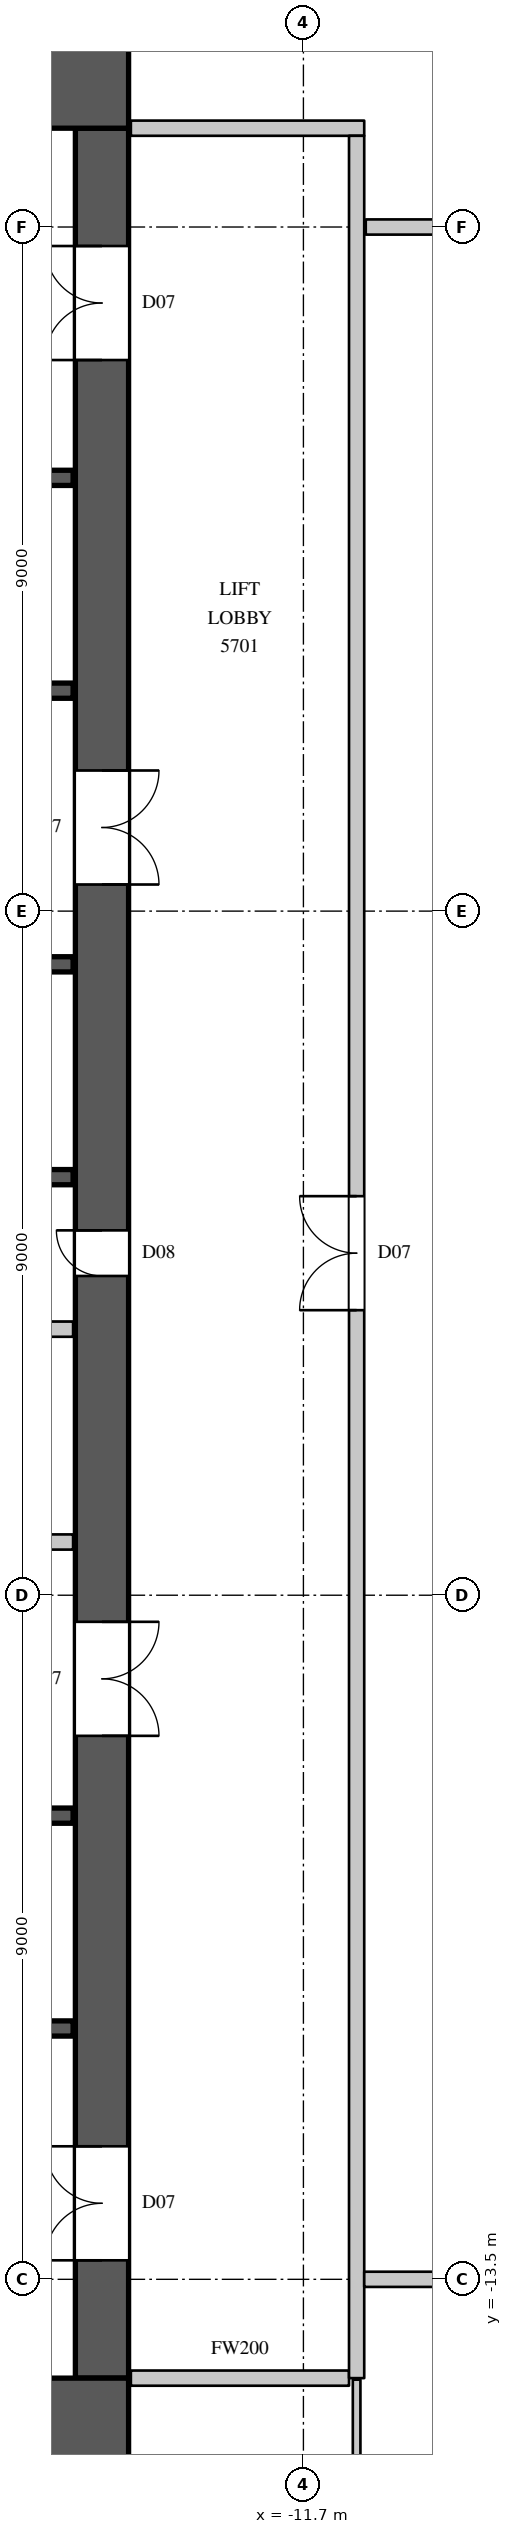
"""IFC4 building model, lengths in metres.
Left out: names, types, materials, properties, quantities, classifications, styles, units other than length and angle.
Written with IfcOpenShell. Run it as: python <this file> out.ifc"""

import sys

from ifc_helpers import new_model, si_unit, direction, frame, frame_2d, origin, place, context, subcontext, project, spatial, rectangle, extrude, element, fill, save


model = new_model("IFC4")
c1 = context("Model", 3, precision=1e-05, world=origin(), true_north=direction((0.0, 1.0)))
c2 = subcontext(c1, "Body", "Model", "MODEL_VIEW")
j1 = project(units=[si_unit("LENGTHUNIT", "METRE"), si_unit("PLANEANGLEUNIT", "RADIAN")], contexts=[c1])
p1 = place(None, origin())
s1 = spatial("IfcSite", under=j1, at=p1, CompositionType="ELEMENT")
p2 = place(p1, origin())
s2 = spatial("IfcBuilding", under=s1, at=p2, CompositionType="ELEMENT")
p3 = place(p2, frame((0.0, 0.0, 255.7)))
s3 = spatial("IfcBuildingStorey", under=s2, at=p3, CompositionType="ELEMENT", Elevation=255.7)
for number, where, z_axis, x_axis in (
    (1, (-30.0, 15.4, 0.0), (0.0, 0.0, 1.0), (1.0, 0.0, 0.0)),
    (2, (-30.0, -15.4, 0.0), (0.0, 0.0, 1.0), (1.0, 0.0, 0.0)),
):
    element("IfcWall", number, at=place(p3, frame(where, z_axis=z_axis, x_axis=x_axis)), inside=s3, PredefinedType="SHEAR", context=c2, shape_type="SweptSolid", body=[
        extrude(rectangle(XDim=16.0, YDim=1.2, at=frame_2d((8.0, 0.0))), origin(), (0.0, 0.0, 1.0), 4.1),
    ])
p4 = place(p3, frame((-14.35, -14.8, 0.0), z_axis=(0.0, 0.0, 1.0), x_axis=(0.0, 1.0, 0.0)))
e3 = element("IfcWall", 3, at=p4, inside=s3, PredefinedType="SHEAR", context=c2, shape_type="SweptSolid", body=[
    extrude(rectangle(XDim=29.6, YDim=0.7, at=frame_2d((14.8, 0.0))), origin(), (0.0, 0.0, 1.0), 4.1),
])
p5 = place(p4, frame((1.55, 0.0, 0.0)))
e4 = element("IfcOpeningElement", 4, at=p5, cuts=e3, PredefinedType="OPENING", context=c2, shape_type="SweptSolid", body=[
    extrude(rectangle(XDim=1.5, YDim=2.4, at=frame_2d((0.75, 1.2))), frame((0.0, 0.36, 0.0), z_axis=(0.0, -1.0, 0.0), x_axis=(1.0, 0.0, 0.0)), (0.0, 0.0, 1.0), 0.72),
])
p6 = place(p4, frame((26.55, 0.0, 0.0)))
e5 = element("IfcOpeningElement", 5, at=p6, cuts=e3, PredefinedType="OPENING", context=c2, shape_type="SweptSolid", body=[
    extrude(rectangle(XDim=1.5, YDim=2.4, at=frame_2d((0.75, 1.2))), frame((0.0, 0.36, 0.0), z_axis=(0.0, -1.0, 0.0), x_axis=(1.0, 0.0, 0.0)), (0.0, 0.0, 1.0), 0.72),
])
p7 = place(p4, frame((8.45, 0.0, 0.0)))
e6 = element("IfcOpeningElement", 6, at=p7, cuts=e3, PredefinedType="OPENING", context=c2, shape_type="SweptSolid", body=[
    extrude(rectangle(XDim=1.5, YDim=2.4, at=frame_2d((0.75, 1.2))), frame((0.0, 0.36, 0.0), z_axis=(0.0, -1.0, 0.0), x_axis=(1.0, 0.0, 0.0)), (0.0, 0.0, 1.0), 0.72),
])
p8 = place(p4, frame((19.65, 0.0, 0.0)))
e7 = element("IfcOpeningElement", 7, at=p8, cuts=e3, PredefinedType="OPENING", context=c2, shape_type="SweptSolid", body=[
    extrude(rectangle(XDim=1.5, YDim=2.4, at=frame_2d((0.75, 1.2))), frame((0.0, 0.36, 0.0), z_axis=(0.0, -1.0, 0.0), x_axis=(1.0, 0.0, 0.0)), (0.0, 0.0, 1.0), 0.72),
])
p9 = place(p4, frame((14.5, 0.0, 0.0)))
e8 = element("IfcOpeningElement", 8, at=p9, cuts=e3, PredefinedType="OPENING", context=c2, shape_type="SweptSolid", body=[
    extrude(rectangle(XDim=0.6, YDim=2.0, at=frame_2d((0.3, 1.0))), frame((0.0, 0.36, 0.0), z_axis=(0.0, -1.0, 0.0), x_axis=(1.0, 0.0, 0.0)), (0.0, 0.0, 1.0), 0.72),
])
p10 = place(p3, frame((-29.27, -3.8, 0.0), z_axis=(0.0, 0.0, 1.0), x_axis=(1.0, 0.0, 0.0)))
e9 = element("IfcWall", 9, at=p10, inside=s3, PredefinedType="PARTITIONING", context=c2, shape_type="SweptSolid", body=[
    extrude(rectangle(XDim=14.54, YDim=0.2, at=frame_2d((7.27, 0.0))), origin(), (0.0, 0.0, 1.0), 3.8),
])
p11 = place(p10, frame((6.8, 0.0, 0.0)))
e10 = element("IfcOpeningElement", 10, at=p11, cuts=e9, PredefinedType="OPENING", context=c2, shape_type="SweptSolid", body=[
    extrude(rectangle(XDim=0.9, YDim=2.2, at=frame_2d((0.45, 1.1))), frame((0.0, 0.11, 0.0), z_axis=(0.0, -1.0, 0.0), x_axis=(1.0, 0.0, 0.0)), (0.0, 0.0, 1.0), 0.22),
])
p12 = place(p3, frame((-13.97, -14.8, 0.0), z_axis=(0.0, 0.0, 1.0), x_axis=(1.0, 0.0, 0.0)))
e11 = element("IfcWall", 11, at=p12, inside=s3, PredefinedType="PARTITIONING", context=c2, shape_type="SweptSolid", body=[
    extrude(rectangle(XDim=2.87, YDim=0.2, at=frame_2d((1.435, 0.0))), origin(), (0.0, 0.0, 1.0), 3.8),
])
p13 = place(p3, frame((-13.97, 14.8, 0.0), z_axis=(0.0, 0.0, 1.0), x_axis=(1.0, 0.0, 0.0)))
e12 = element("IfcWall", 12, at=p13, inside=s3, PredefinedType="PARTITIONING", context=c2, shape_type="SweptSolid", body=[
    extrude(rectangle(XDim=3.07, YDim=0.2, at=frame_2d((1.535, 0.0))), origin(), (0.0, 0.0, 1.0), 3.8),
])
p14 = place(p3, frame((-11.0, -14.8, 0.0), z_axis=(0.0, 0.0, 1.0), x_axis=(0.0, 1.0, 0.0)))
e13 = element("IfcWall", 13, at=p14, inside=s3, PredefinedType="PARTITIONING", context=c2, shape_type="SweptSolid", body=[
    extrude(rectangle(XDim=29.5, YDim=0.2, at=frame_2d((14.75, 0.0))), origin(), (0.0, 0.0, 1.0), 3.8),
])
p15 = place(p14, frame((14.05, 0.0, 0.0)))
e14 = element("IfcOpeningElement", 14, at=p15, cuts=e13, PredefinedType="OPENING", context=c2, shape_type="SweptSolid", body=[
    extrude(rectangle(XDim=1.5, YDim=2.4, at=frame_2d((0.75, 1.2))), frame((0.0, 0.11, 0.0), z_axis=(0.0, -1.0, 0.0), x_axis=(1.0, 0.0, 0.0)), (0.0, 0.0, 1.0), 0.22),
])
p16 = place(p3, frame((-10.9, -13.5, 0.0), z_axis=(0.0, 0.0, 1.0), x_axis=(1.0, 0.0, 0.0)))
e15 = element("IfcWall", 15, at=p16, inside=s3, PredefinedType="PARTITIONING", context=c2, shape_type="SweptSolid", body=[
    extrude(rectangle(XDim=23.3, YDim=0.2, at=frame_2d((11.65, 0.0))), origin(), (0.0, 0.0, 1.0), 3.8),
])
p17 = place(p16, frame((1.1, 0.0, 0.0)))
e16 = element("IfcOpeningElement", 16, at=p17, cuts=e15, PredefinedType="OPENING", context=c2, shape_type="SweptSolid", body=[
    extrude(rectangle(XDim=0.9, YDim=2.2, at=frame_2d((0.45, 1.1))), frame((0.0, 0.11, 0.0), z_axis=(0.0, -1.0, 0.0), x_axis=(1.0, 0.0, 0.0)), (0.0, 0.0, 1.0), 0.22),
])
p18 = place(p16, frame((4.4, 0.0, 0.0)))
e17 = element("IfcOpeningElement", 17, at=p18, cuts=e15, PredefinedType="OPENING", context=c2, shape_type="SweptSolid", body=[
    extrude(rectangle(XDim=0.9, YDim=2.2, at=frame_2d((0.45, 1.1))), frame((0.0, 0.11, 0.0), z_axis=(0.0, -1.0, 0.0), x_axis=(1.0, 0.0, 0.0)), (0.0, 0.0, 1.0), 0.22),
])
p19 = place(p16, frame((7.25, 0.0, 0.0)))
e18 = element("IfcOpeningElement", 18, at=p19, cuts=e15, PredefinedType="OPENING", context=c2, shape_type="SweptSolid", body=[
    extrude(rectangle(XDim=0.9, YDim=2.2, at=frame_2d((0.45, 1.1))), frame((0.0, 0.11, 0.0), z_axis=(0.0, -1.0, 0.0), x_axis=(1.0, 0.0, 0.0)), (0.0, 0.0, 1.0), 0.22),
])
p20 = place(p16, frame((10.6, 0.0, 0.0)))
e19 = element("IfcOpeningElement", 19, at=p20, cuts=e15, PredefinedType="OPENING", context=c2, shape_type="SweptSolid", body=[
    extrude(rectangle(XDim=1.1, YDim=2.4, at=frame_2d((0.55, 1.2))), frame((0.0, 0.11, 0.0), z_axis=(0.0, -1.0, 0.0), x_axis=(1.0, 0.0, 0.0)), (0.0, 0.0, 1.0), 0.22),
])
p21 = place(p3, frame((-10.88, 13.5, 0.0), z_axis=(0.0, 0.0, 1.0), x_axis=(1.0, 0.0, 0.0)))
e20 = element("IfcWall", 20, at=p21, inside=s3, PredefinedType="PARTITIONING", context=c2, shape_type="SweptSolid", body=[
    extrude(rectangle(XDim=4.58, YDim=0.2, at=frame_2d((2.29, 0.0))), origin(), (0.0, 0.0, 1.0), 3.8),
])
p22 = place(p3, frame((-29.27, -1.0, 0.0), z_axis=(0.0, 0.0, 1.0), x_axis=(1.0, 0.0, 0.0)))
e21 = element("IfcWall", 21, at=p22, inside=s3, PredefinedType="PARTITIONING", context=c2, shape_type="SweptSolid", body=[
    extrude(rectangle(XDim=14.54, YDim=0.2, at=frame_2d((7.27, 0.0))), origin(), (0.0, 0.0, 1.0), 3.8),
])
p23 = place(p3, frame((-17.92, -10.2, 0.0), z_axis=(0.0, 0.0, 1.0), x_axis=(1.0, 0.0, 0.0)))
e22 = element("IfcWall", 22, at=p23, inside=s3, PredefinedType="SHEAR", context=c2, shape_type="SweptSolid", body=[
    extrude(rectangle(XDim=3.19, YDim=0.2, at=frame_2d((1.595, 0.0))), origin(), (0.0, 0.0, 1.0), 3.8),
])
p24 = place(p23, frame((1.05, 0.0, 0.0)))
e23 = element("IfcOpeningElement", 23, at=p24, cuts=e22, PredefinedType="OPENING", context=c2, shape_type="SweptSolid", body=[
    extrude(rectangle(XDim=1.1, YDim=2.2, at=frame_2d((0.55, 1.1))), frame((0.0, 0.11, 0.0), z_axis=(0.0, -1.0, 0.0), x_axis=(1.0, 0.0, 0.0)), (0.0, 0.0, 1.0), 0.22),
])
for number, where, z_axis, x_axis in (
    (24, (-17.9, -7.4, 0.0), (0.0, 0.0, 1.0), (1.0, 0.0, 0.0)),
    (25, (-17.9, 1.0, 0.0), (0.0, 0.0, 1.0), (1.0, 0.0, 0.0)),
):
    element("IfcWall", number, at=place(p3, frame(where, z_axis=z_axis, x_axis=x_axis)), inside=s3, PredefinedType="SHEAR", context=c2, shape_type="SweptSolid", body=[
        extrude(rectangle(XDim=3.17, YDim=0.2, at=frame_2d((1.585, 0.0))), origin(), (0.0, 0.0, 1.0), 3.8),
    ])
p25 = place(p3, frame((-17.9, 3.8, 0.0), z_axis=(0.0, 0.0, 1.0), x_axis=(1.0, 0.0, 0.0)))
e26 = element("IfcWall", 26, at=p25, inside=s3, PredefinedType="SHEAR", context=c2, shape_type="SweptSolid", body=[
    extrude(rectangle(XDim=3.17, YDim=0.2, at=frame_2d((1.585, 0.0))), origin(), (0.0, 0.0, 1.0), 3.8),
])
p26 = place(p25, frame((1.05, 0.0, 0.0)))
e27 = element("IfcOpeningElement", 27, at=p26, cuts=e26, PredefinedType="OPENING", context=c2, shape_type="SweptSolid", body=[
    extrude(rectangle(XDim=1.1, YDim=2.2, at=frame_2d((0.55, 1.1))), frame((0.0, 0.11, 0.0), z_axis=(0.0, -1.0, 0.0), x_axis=(1.0, 0.0, 0.0)), (0.0, 0.0, 1.0), 0.22),
])
p27 = place(p3, frame((-17.92, 7.4, 0.0), z_axis=(0.0, 0.0, 1.0), x_axis=(1.0, 0.0, 0.0)))
e28 = element("IfcWall", 28, at=p27, inside=s3, PredefinedType="SHEAR", context=c2, shape_type="SweptSolid", body=[
    extrude(rectangle(XDim=3.19, YDim=0.2, at=frame_2d((1.595, 0.0))), origin(), (0.0, 0.0, 1.0), 3.8),
])
p28 = place(p3, frame((-17.92, 10.2, 0.0), z_axis=(0.0, 0.0, 1.0), x_axis=(1.0, 0.0, 0.0)))
e29 = element("IfcWall", 29, at=p28, inside=s3, PredefinedType="SHEAR", context=c2, shape_type="SweptSolid", body=[
    extrude(rectangle(XDim=3.19, YDim=0.2, at=frame_2d((1.595, 0.0))), origin(), (0.0, 0.0, 1.0), 3.8),
])
p29 = place(p28, frame((1.05, 0.0, 0.0)))
e30 = element("IfcOpeningElement", 30, at=p29, cuts=e29, PredefinedType="OPENING", context=c2, shape_type="SweptSolid", body=[
    extrude(rectangle(XDim=1.1, YDim=2.2, at=frame_2d((0.55, 1.1))), frame((0.0, 0.11, 0.0), z_axis=(0.0, -1.0, 0.0), x_axis=(1.0, 0.0, 0.0)), (0.0, 0.0, 1.0), 0.22),
])
p30 = place(p3, frame((-11.0, -23.757, 0.0), z_axis=(0.0, 0.0, 1.0), x_axis=(0.0, 1.0, 0.0)))
e31 = element("IfcWall", 31, at=p30, inside=s3, PredefinedType="PARTITIONING", context=c2, shape_type="SweptSolid", body=[
    extrude(rectangle(XDim=8.937, YDim=0.1, at=frame_2d((4.468, 0.0))), origin(), (0.0, 0.0, 1.0), 3.8),
])
p31 = place(p15, origin())
e32 = element("IfcDoor", 32, at=p31, inside=s3, OperationType="DOUBLE_DOOR_SINGLE_SWING", PredefinedType="DOOR", context=c2, shape_type="SweptSolid", body=[
    extrude(rectangle(XDim=1.5, YDim=2.4, at=frame_2d((0.75, 1.2))), frame((0.0, 0.025, 0.0), z_axis=(0.0, -1.0, 0.0), x_axis=(1.0, 0.0, 0.0)), (0.0, 0.0, 1.0), 0.05),
])
fill(e14, e32)
p32 = place(p5, origin())
e33 = element("IfcDoor", 33, at=p32, inside=s3, OperationType="DOUBLE_DOOR_SINGLE_SWING", PredefinedType="DOOR", context=c2, shape_type="SweptSolid", body=[
    extrude(rectangle(XDim=1.5, YDim=2.4, at=frame_2d((0.75, 1.2))), frame((0.0, 0.345, 0.0), z_axis=(0.0, -1.0, 0.0), x_axis=(1.0, 0.0, 0.0)), (0.0, 0.0, 1.0), 0.05),
])
fill(e4, e33)
p33 = place(p6, origin())
e34 = element("IfcDoor", 34, at=p33, inside=s3, OperationType="DOUBLE_DOOR_SINGLE_SWING", PredefinedType="DOOR", context=c2, shape_type="SweptSolid", body=[
    extrude(rectangle(XDim=1.5, YDim=2.4, at=frame_2d((0.75, 1.2))), frame((0.0, 0.345, 0.0), z_axis=(0.0, -1.0, 0.0), x_axis=(1.0, 0.0, 0.0)), (0.0, 0.0, 1.0), 0.05),
])
fill(e5, e34)
p34 = place(p7, origin())
e35 = element("IfcDoor", 35, at=p34, inside=s3, OperationType="DOUBLE_DOOR_SINGLE_SWING", PredefinedType="DOOR", context=c2, shape_type="SweptSolid", body=[
    extrude(rectangle(XDim=1.5, YDim=2.4, at=frame_2d((0.75, 1.2))), frame((0.0, -0.295, 0.0), z_axis=(0.0, -1.0, 0.0), x_axis=(1.0, 0.0, 0.0)), (0.0, 0.0, 1.0), 0.05),
])
fill(e6, e35)
p35 = place(p8, origin())
e36 = element("IfcDoor", 36, at=p35, inside=s3, OperationType="DOUBLE_DOOR_SINGLE_SWING", PredefinedType="DOOR", context=c2, shape_type="SweptSolid", body=[
    extrude(rectangle(XDim=1.5, YDim=2.4, at=frame_2d((0.75, 1.2))), frame((0.0, -0.295, 0.0), z_axis=(0.0, -1.0, 0.0), x_axis=(1.0, 0.0, 0.0)), (0.0, 0.0, 1.0), 0.05),
])
fill(e7, e36)
p36 = place(p9, origin())
e37 = element("IfcDoor", 37, at=p36, inside=s3, OperationType="SINGLE_SWING_RIGHT", PredefinedType="DOOR", context=c2, shape_type="SweptSolid", body=[
    extrude(rectangle(XDim=0.6, YDim=2.0, at=frame_2d((0.3, 1.0))), frame((0.0, 0.345, 0.0), z_axis=(0.0, -1.0, 0.0), x_axis=(1.0, 0.0, 0.0)), (0.0, 0.0, 1.0), 0.05),
])
fill(e8, e37)
save(model, sys.argv[1])
